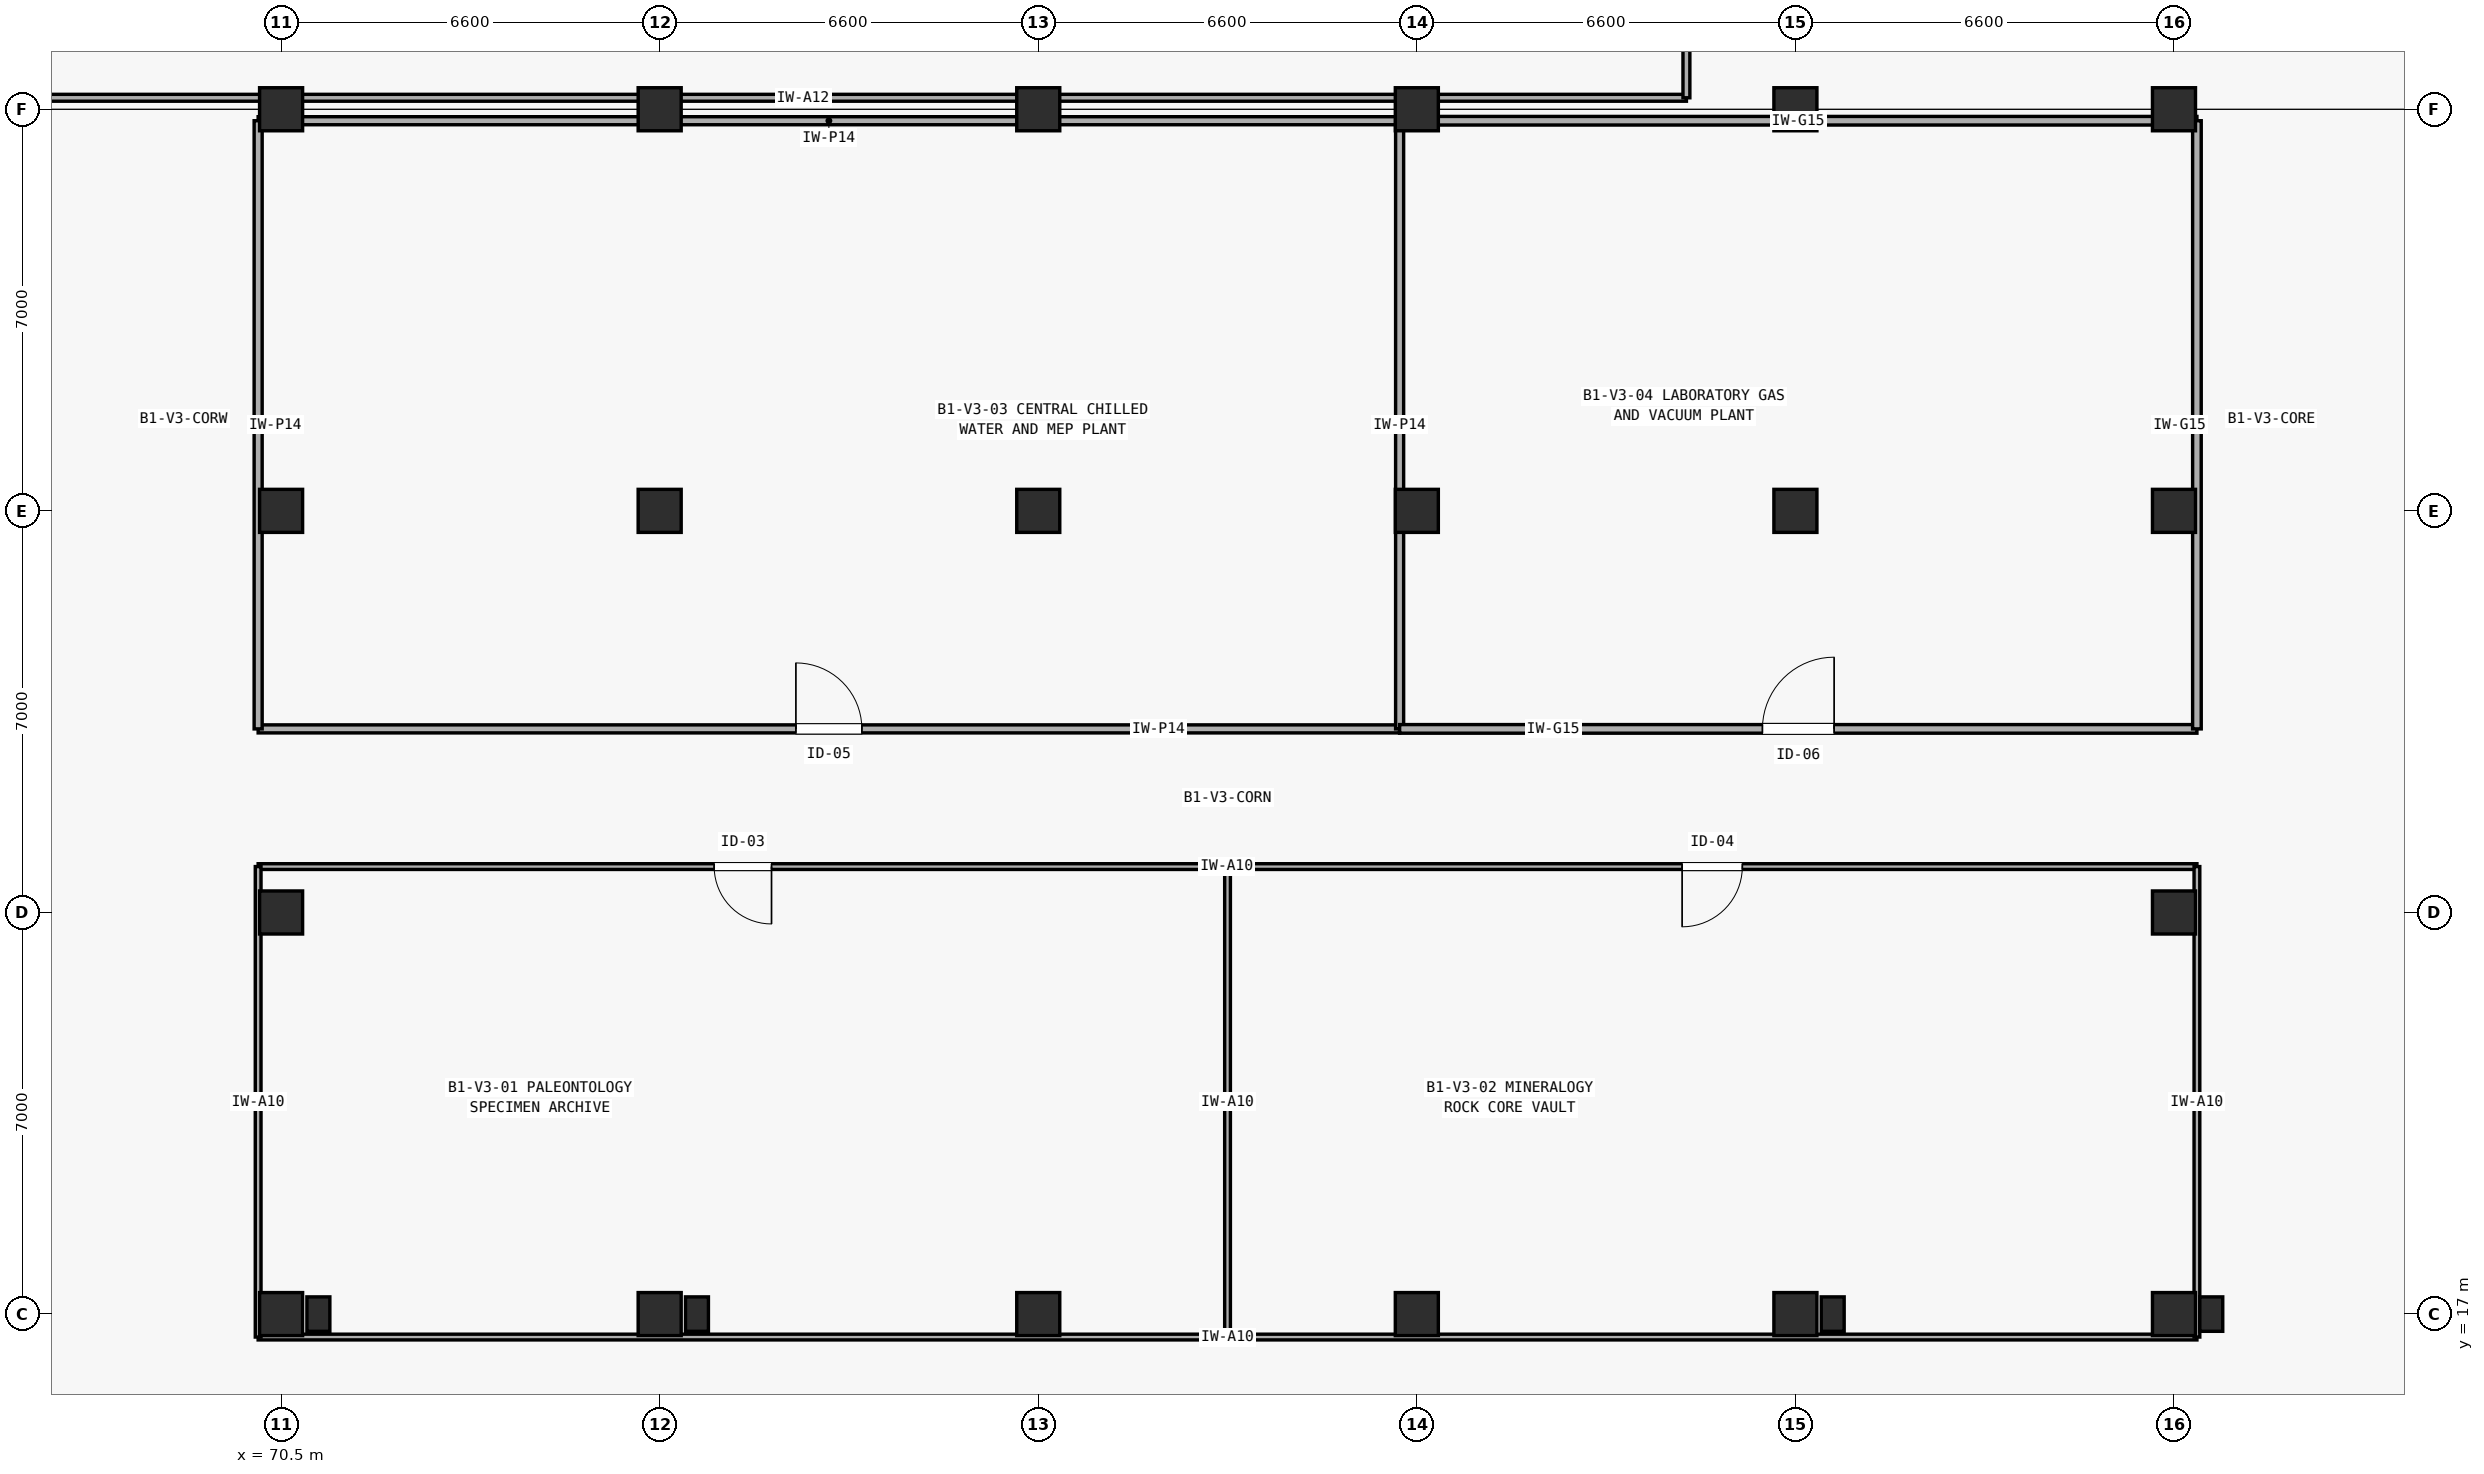
"""IFC4 building model, lengths in metres.
Left out: names, types, materials, properties, quantities, classifications, styles, units other than length and angle.
Written with IfcOpenShell. Run it as: python <this file> out.ifc"""

import sys

from ifc_helpers import new_model, si_unit, direction, frame, frame_2d, origin, origin_2d, place, context, subcontext, project, spatial, rectangle, extrude, element, fill, save


model = new_model("IFC4")
c1 = context("Model", 3, precision=1e-05, world=origin(), true_north=direction((0.0, 1.0)))
c2 = subcontext(c1, "Body", "Model", "MODEL_VIEW")
j1 = project(units=[si_unit("LENGTHUNIT", "METRE"), si_unit("PLANEANGLEUNIT", "RADIAN")], contexts=[c1])
p1 = place(None, origin())
s1 = spatial("IfcSite", under=j1, at=p1, CompositionType="ELEMENT")
p2 = place(p1, origin())
s2 = spatial("IfcBuilding", under=s1, at=p2, CompositionType="ELEMENT")
p3 = place(p2, frame((0.0, 0.0, -4.2)))
s3 = spatial("IfcBuildingStorey", under=s2, at=p3, CompositionType="ELEMENT", Elevation=-4.2)
for number, where, z_axis, x_axis in (
    (1, (70.5, 17.0, -0.4), (0.0, 0.0, 1.0), (1.0, 0.0, 0.0)),
    (2, (70.5, 24.0, -0.4), (0.0, 0.0, 1.0), (1.0, 0.0, 0.0)),
    (3, (70.5, 31.0, -0.4), (0.0, 0.0, 1.0), (1.0, 0.0, 0.0)),
    (4, (70.5, 38.0, -0.4), (0.0, 0.0, 1.0), (1.0, 0.0, 0.0)),
    (5, (77.1, 17.0, -0.4), (0.0, 0.0, 1.0), (1.0, 0.0, 0.0)),
    (6, (77.1, 31.0, -0.4), (0.0, 0.0, 1.0), (1.0, 0.0, 0.0)),
    (7, (77.1, 38.0, -0.4), (0.0, 0.0, 1.0), (1.0, 0.0, 0.0)),
    (8, (83.7, 17.0, -0.4), (0.0, 0.0, 1.0), (1.0, 0.0, 0.0)),
    (9, (83.7, 31.0, -0.4), (0.0, 0.0, 1.0), (1.0, 0.0, 0.0)),
    (10, (83.7, 38.0, -0.4), (0.0, 0.0, 1.0), (1.0, 0.0, 0.0)),
    (11, (90.3, 17.0, -0.4), (0.0, 0.0, 1.0), (1.0, 0.0, 0.0)),
    (12, (90.3, 31.0, -0.4), (0.0, 0.0, 1.0), (1.0, 0.0, 0.0)),
    (13, (90.3, 38.0, -0.4), (0.0, 0.0, 1.0), (1.0, 0.0, 0.0)),
    (14, (96.9, 17.0, -0.4), (0.0, 0.0, 1.0), (1.0, 0.0, 0.0)),
    (15, (96.9, 31.0, -0.4), (0.0, 0.0, 1.0), (1.0, 0.0, 0.0)),
    (16, (96.9, 38.0, -0.4), (0.0, 0.0, 1.0), (1.0, 0.0, 0.0)),
    (17, (103.5, 17.0, -0.4), (0.0, 0.0, 1.0), (1.0, 0.0, 0.0)),
    (18, (103.5, 24.0, -0.4), (0.0, 0.0, 1.0), (1.0, 0.0, 0.0)),
    (19, (103.5, 31.0, -0.4), (0.0, 0.0, 1.0), (1.0, 0.0, 0.0)),
    (20, (103.5, 38.0, -0.4), (0.0, 0.0, 1.0), (1.0, 0.0, 0.0)),
):
    element("IfcColumn", number, at=place(p3, frame(where, z_axis=z_axis, x_axis=x_axis)), inside=s3, PredefinedType="COLUMN", context=c2, shape_type="SweptSolid", body=[
        extrude(rectangle(XDim=0.75, YDim=0.75, at=origin_2d()), origin(), (0.0, 0.0, 1.0), 4.6),
    ])
for number, where, z_axis, x_axis in (
    (21, (71.15, 17.0, -0.4), (0.0, 0.0, 1.0), (1.0, 0.0, 0.0)),
    (22, (77.75, 17.0, -0.4), (0.0, 0.0, 1.0), (1.0, 0.0, 0.0)),
    (23, (97.55, 17.0, -0.4), (0.0, 0.0, 1.0), (1.0, 0.0, 0.0)),
    (24, (104.15, 17.0, -0.4), (0.0, 0.0, 1.0), (1.0, 0.0, 0.0)),
):
    element("IfcColumn", number, at=place(p3, frame(where, z_axis=z_axis, x_axis=x_axis)), inside=s3, PredefinedType="PILASTER", context=c2, shape_type="SweptSolid", body=[
        extrude(rectangle(XDim=0.4, YDim=0.6, at=origin_2d()), origin(), (0.0, 0.0, 1.0), 4.6),
    ])
p4 = place(p3, frame((70.1, 16.6, 0.0), z_axis=(0.0, 0.0, 1.0), x_axis=(1.0, 0.0, 0.0)))
e25 = element("IfcWall", 25, at=p4, inside=s3, PredefinedType="PARTITIONING", context=c2, shape_type="SweptSolid", body=[
    extrude(rectangle(XDim=16.9, YDim=0.1, at=frame_2d((8.45, 0.0))), origin(), (0.0, 0.0, 1.0), 3.135),
])
p5 = place(p3, frame((70.1, 24.8, 0.0), z_axis=(0.0, 0.0, 1.0), x_axis=(1.0, 0.0, 0.0)))
e26 = element("IfcWall", 26, at=p5, inside=s3, PredefinedType="PARTITIONING", context=c2, shape_type="SweptSolid", body=[
    extrude(rectangle(XDim=16.9, YDim=0.1, at=frame_2d((8.45, 0.0))), origin(), (0.0, 0.0, 1.0), 3.9),
])
p6 = place(p5, frame((7.95, 0.0, 0.0)))
e27 = element("IfcOpeningElement", 27, at=p6, cuts=e26, PredefinedType="OPENING", context=c2, shape_type="SweptSolid", body=[
    extrude(rectangle(XDim=1.0, YDim=2.1, at=frame_2d((0.5, 1.05))), frame((0.0, 0.06, 0.0), z_axis=(0.0, -1.0, 0.0), x_axis=(1.0, 0.0, 0.0)), (0.0, 0.0, 1.0), 0.12),
])
for number, where, z_axis, x_axis in (
    (28, (70.1, 16.6, 0.0), (0.0, 0.0, 1.0), (0.0, 1.0, 0.0)),
    (29, (87.0, 16.6, 0.0), (0.0, 0.0, 1.0), (0.0, 1.0, 0.0)),
):
    element("IfcWall", number, at=place(p3, frame(where, z_axis=z_axis, x_axis=x_axis)), inside=s3, PredefinedType="PARTITIONING", context=c2, shape_type="SweptSolid", body=[
        extrude(rectangle(XDim=8.2, YDim=0.1, at=frame_2d((4.1, 0.0))), origin(), (0.0, 0.0, 1.0), 3.9),
    ])
p7 = place(p3, frame((87.0, 16.6, 0.0), z_axis=(0.0, 0.0, 1.0), x_axis=(1.0, 0.0, 0.0)))
e30 = element("IfcWall", 30, at=p7, inside=s3, PredefinedType="PARTITIONING", context=c2, shape_type="SweptSolid", body=[
    extrude(rectangle(XDim=16.9, YDim=0.1, at=frame_2d((8.45, 0.0))), origin(), (0.0, 0.0, 1.0), 3.135),
])
p8 = place(p3, frame((87.0, 24.8, 0.0), z_axis=(0.0, 0.0, 1.0), x_axis=(1.0, 0.0, 0.0)))
e31 = element("IfcWall", 31, at=p8, inside=s3, PredefinedType="PARTITIONING", context=c2, shape_type="SweptSolid", body=[
    extrude(rectangle(XDim=16.9, YDim=0.1, at=frame_2d((8.45, 0.0))), origin(), (0.0, 0.0, 1.0), 3.9),
])
p9 = place(p8, frame((7.925, 0.0, 0.0)))
e32 = element("IfcOpeningElement", 32, at=p9, cuts=e31, PredefinedType="OPENING", context=c2, shape_type="SweptSolid", body=[
    extrude(rectangle(XDim=1.05, YDim=2.15, at=frame_2d((0.525, 1.075))), frame((0.0, 0.06, 0.0), z_axis=(0.0, -1.0, 0.0), x_axis=(1.0, 0.0, 0.0)), (0.0, 0.0, 1.0), 0.12),
])
p10 = place(p3, frame((103.9, 16.6, 0.0), z_axis=(0.0, 0.0, 1.0), x_axis=(0.0, 1.0, 0.0)))
e33 = element("IfcWall", 33, at=p10, inside=s3, PredefinedType="PARTITIONING", context=c2, shape_type="SweptSolid", body=[
    extrude(rectangle(XDim=8.2, YDim=0.1, at=frame_2d((4.1, 0.0))), origin(), (0.0, 0.0, 1.0), 3.9),
])
p11 = place(p3, frame((70.1, 27.2, 0.0), z_axis=(0.0, 0.0, 1.0), x_axis=(1.0, 0.0, 0.0)))
e34 = element("IfcWall", 34, at=p11, inside=s3, PredefinedType="PLUMBINGWALL", context=c2, shape_type="SweptSolid", body=[
    extrude(rectangle(XDim=19.9, YDim=0.14, at=frame_2d((9.95, 0.0))), origin(), (0.0, 0.0, 1.0), 3.9),
])
p12 = place(p11, frame((9.375, 0.0, 0.0)))
e35 = element("IfcOpeningElement", 35, at=p12, cuts=e34, PredefinedType="OPENING", context=c2, shape_type="SweptSolid", body=[
    extrude(rectangle(XDim=1.15, YDim=2.15, at=frame_2d((0.575, 1.075))), frame((0.0, 0.08, 0.0), z_axis=(0.0, -1.0, 0.0), x_axis=(1.0, 0.0, 0.0)), (0.0, 0.0, 1.0), 0.16),
])
p13 = place(p3, frame((70.1, 37.8, 0.0), z_axis=(0.0, 0.0, 1.0), x_axis=(1.0, 0.0, 0.0)))
e36 = element("IfcWall", 36, at=p13, inside=s3, PredefinedType="PLUMBINGWALL", context=c2, shape_type="SweptSolid", body=[
    extrude(rectangle(XDim=19.9, YDim=0.14, at=frame_2d((9.95, 0.0))), origin(), (0.0, 0.0, 1.0), 3.135),
])
p14 = place(p3, frame((70.1, 27.2, 0.0), z_axis=(0.0, 0.0, 1.0), x_axis=(0.0, 1.0, 0.0)))
e37 = element("IfcWall", 37, at=p14, inside=s3, PredefinedType="PLUMBINGWALL", context=c2, shape_type="SweptSolid", body=[
    extrude(rectangle(XDim=10.6, YDim=0.14, at=frame_2d((5.3, 0.0))), origin(), (0.0, 0.0, 1.0), 3.9),
])
p15 = place(p3, frame((90.0, 27.2, 0.0), z_axis=(0.0, 0.0, 1.0), x_axis=(0.0, 1.0, 0.0)))
e38 = element("IfcWall", 38, at=p15, inside=s3, PredefinedType="PLUMBINGWALL", context=c2, shape_type="SweptSolid", body=[
    extrude(rectangle(XDim=10.6, YDim=0.14, at=frame_2d((5.3, 0.0))), origin(), (0.0, 0.0, 1.0), 3.425),
])
p16 = place(p3, frame((90.0, 27.2, 0.0), z_axis=(0.0, 0.0, 1.0), x_axis=(1.0, 0.0, 0.0)))
e39 = element("IfcWall", 39, at=p16, inside=s3, PredefinedType="PARTITIONING", context=c2, shape_type="SweptSolid", body=[
    extrude(rectangle(XDim=13.9, YDim=0.15, at=frame_2d((6.95, 0.0))), origin(), (0.0, 0.0, 1.0), 3.9),
])
p17 = place(p16, frame((6.325, 0.0, 0.0)))
e40 = element("IfcOpeningElement", 40, at=p17, cuts=e39, PredefinedType="OPENING", context=c2, shape_type="SweptSolid", body=[
    extrude(rectangle(XDim=1.25, YDim=2.15, at=frame_2d((0.625, 1.075))), frame((0.0, 0.085, 0.0), z_axis=(0.0, -1.0, 0.0), x_axis=(1.0, 0.0, 0.0)), (0.0, 0.0, 1.0), 0.17),
])
p18 = place(p3, frame((90.0, 37.8, 0.0), z_axis=(0.0, 0.0, 1.0), x_axis=(1.0, 0.0, 0.0)))
e41 = element("IfcWall", 41, at=p18, inside=s3, PredefinedType="PARTITIONING", context=c2, shape_type="SweptSolid", body=[
    extrude(rectangle(XDim=13.9, YDim=0.15, at=frame_2d((6.95, 0.0))), origin(), (0.0, 0.0, 1.0), 3.135),
])
p19 = place(p3, frame((103.9, 27.2, 0.0), z_axis=(0.0, 0.0, 1.0), x_axis=(0.0, 1.0, 0.0)))
e42 = element("IfcWall", 42, at=p19, inside=s3, PredefinedType="PARTITIONING", context=c2, shape_type="SweptSolid", body=[
    extrude(rectangle(XDim=10.6, YDim=0.15, at=frame_2d((5.3, 0.0))), origin(), (0.0, 0.0, 1.0), 3.9),
])
p20 = place(p3, frame((64.2, 38.2, 0.0), z_axis=(0.0, 0.0, 1.0), x_axis=(1.0, 0.0, 0.0)))
e43 = element("IfcWall", 43, at=p20, inside=s3, PredefinedType="PARTITIONING", context=c2, shape_type="SweptSolid", body=[
    extrude(rectangle(XDim=30.8, YDim=0.12, at=frame_2d((15.4, 0.0))), origin(), (0.0, 0.0, 1.0), 3.135),
])
p21 = place(p3, frame((95.0, 38.2, 0.0), z_axis=(0.0, 0.0, 1.0), x_axis=(0.0, 1.0, 0.0)))
e44 = element("IfcWall", 44, at=p21, inside=s3, PredefinedType="PARTITIONING", context=c2, shape_type="SweptSolid", body=[
    extrude(rectangle(XDim=11.1, YDim=0.12, at=frame_2d((5.55, 0.0))), origin(), (0.0, 0.0, 1.0), 3.9),
])
p22 = place(p6, frame((1.0, 0.0, 0.0), z_axis=(0.0, 0.0, 1.0), x_axis=(-1.0, 0.0, 0.0)))
e45 = element("IfcDoor", 45, at=p22, inside=s3, OperationType="SINGLE_SWING_LEFT", PredefinedType="DOOR", context=c2, shape_type="SweptSolid", body=[
    extrude(rectangle(XDim=1.0, YDim=2.1, at=frame_2d((0.5, 1.05))), frame((0.0, 0.025, 0.0), z_axis=(0.0, -1.0, 0.0), x_axis=(1.0, 0.0, 0.0)), (0.0, 0.0, 1.0), 0.05),
])
fill(e27, e45)
p23 = place(p9, frame((1.05, 0.0, 0.0), z_axis=(0.0, 0.0, 1.0), x_axis=(-1.0, 0.0, 0.0)))
e46 = element("IfcDoor", 46, at=p23, inside=s3, OperationType="SINGLE_SWING_RIGHT", PredefinedType="DOOR", context=c2, shape_type="SweptSolid", body=[
    extrude(rectangle(XDim=1.05, YDim=2.15, at=frame_2d((0.525, 1.075))), frame((0.0, 0.025, 0.0), z_axis=(0.0, -1.0, 0.0), x_axis=(1.0, 0.0, 0.0)), (0.0, 0.0, 1.0), 0.05),
])
fill(e32, e46)
p24 = place(p12, origin())
e47 = element("IfcDoor", 47, at=p24, inside=s3, OperationType="SINGLE_SWING_LEFT", PredefinedType="DOOR", context=c2, shape_type="SweptSolid", body=[
    extrude(rectangle(XDim=1.15, YDim=2.15, at=frame_2d((0.575, 1.075))), frame((0.0, 0.025, 0.0), z_axis=(0.0, -1.0, 0.0), x_axis=(1.0, 0.0, 0.0)), (0.0, 0.0, 1.0), 0.05),
])
fill(e35, e47)
p25 = place(p17, origin())
e48 = element("IfcDoor", 48, at=p25, inside=s3, OperationType="SINGLE_SWING_RIGHT", PredefinedType="DOOR", context=c2, shape_type="SweptSolid", body=[
    extrude(rectangle(XDim=1.25, YDim=2.15, at=frame_2d((0.625, 1.075))), frame((0.0, 0.025, 0.0), z_axis=(0.0, -1.0, 0.0), x_axis=(1.0, 0.0, 0.0)), (0.0, 0.0, 1.0), 0.05),
])
fill(e40, e48)
save(model, sys.argv[1])
